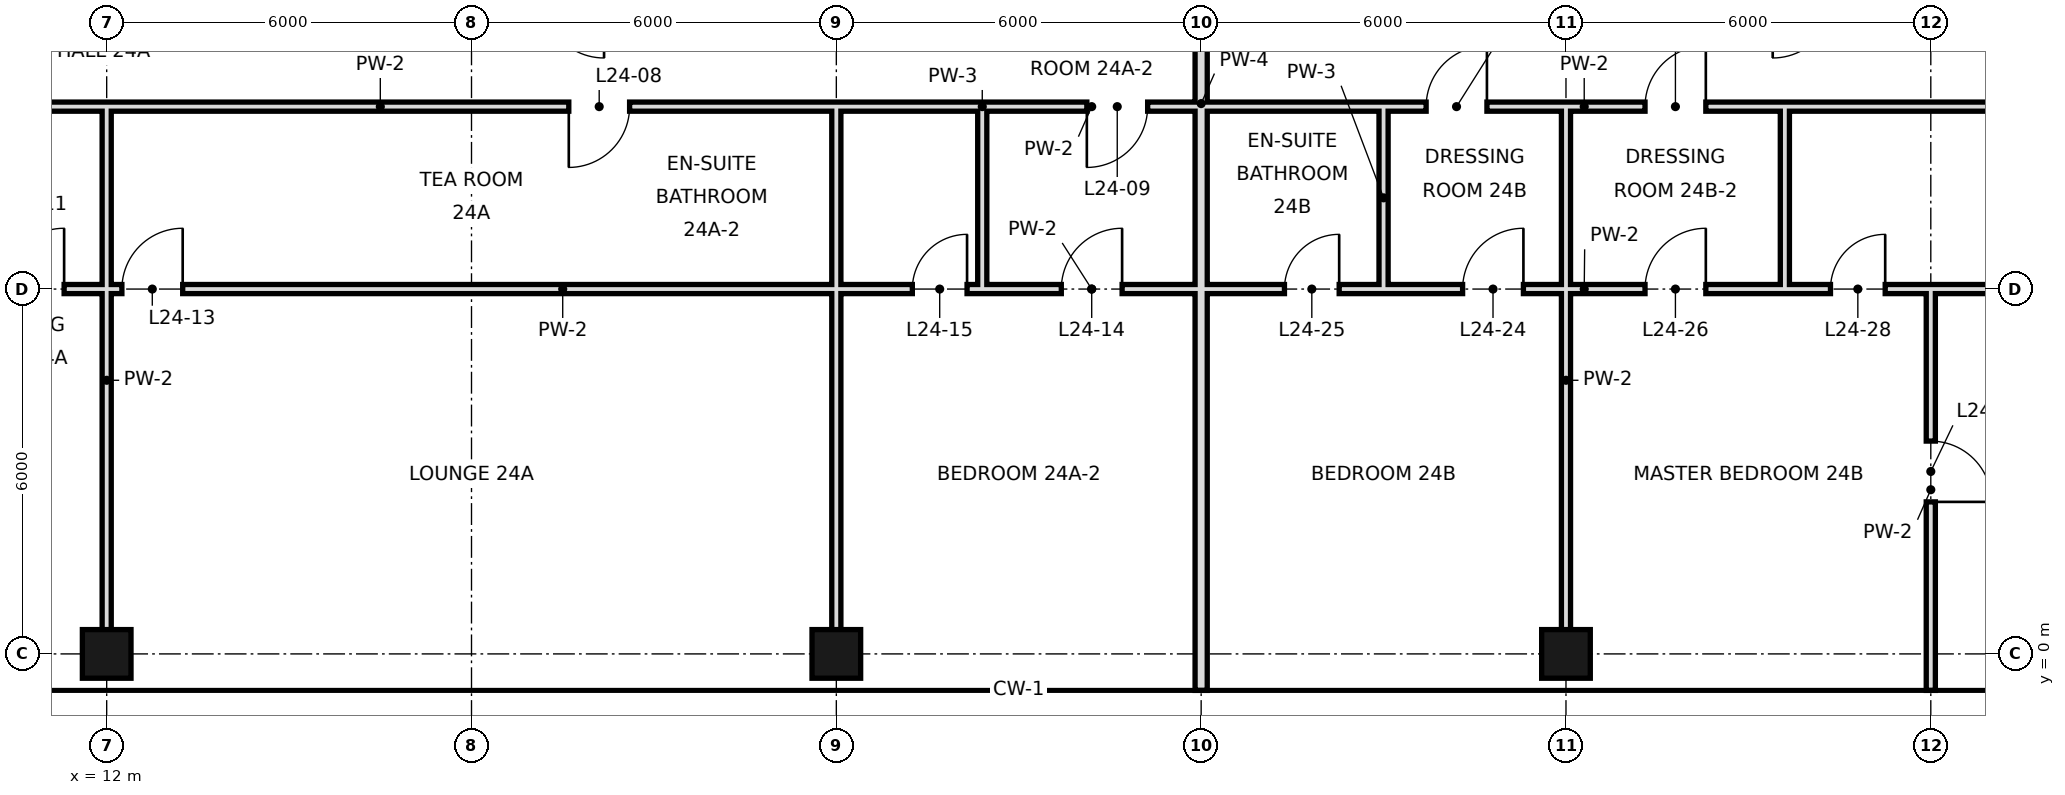
"""IFC4 building model, lengths in metres.
Left out: names, types, materials, properties, quantities, classifications, styles, units other than length and angle.
Written with IfcOpenShell. Run it as: python <this file> out.ifc"""

import sys

from ifc_helpers import new_model, si_unit, direction, frame, frame_2d, origin, origin_2d, place, context, subcontext, project, spatial, rectangle, hollow_rectangle, extrude, element, fill, save


model = new_model("IFC4")
c1 = context("Model", 3, precision=1e-05, world=origin(), true_north=direction((0.0, 1.0)))
c2 = subcontext(c1, "Body", "Model", "MODEL_VIEW")
j1 = project(units=[si_unit("LENGTHUNIT", "METRE"), si_unit("PLANEANGLEUNIT", "RADIAN")], contexts=[c1])
p1 = place(None, origin())
s1 = spatial("IfcSite", under=j1, at=p1, CompositionType="ELEMENT")
p2 = place(p1, origin())
s2 = spatial("IfcBuilding", under=s1, at=p2, CompositionType="ELEMENT")
p3 = place(p2, frame((0.0, 0.0, 110.6)))
s3 = spatial("IfcBuildingStorey", under=s2, at=p3, CompositionType="ELEMENT", Elevation=110.6)
for number, where, z_axis, x_axis in (
    (1, (12.0, 0.0, 0.0), (0.0, 0.0, 1.0), (1.0, 0.0, 0.0)),
    (2, (24.0, 0.0, 0.0), (0.0, 0.0, 1.0), (1.0, 0.0, 0.0)),
    (3, (36.0, 0.0, 0.0), (0.0, 0.0, 1.0), (1.0, 0.0, 0.0)),
):
    element("IfcColumn", number, at=place(p3, frame(where, z_axis=z_axis, x_axis=x_axis)), inside=s3, PredefinedType="COLUMN", context=c2, shape_type="SweptSolid", body=[
        extrude(hollow_rectangle(XDim=0.8, YDim=0.8, WallThickness=0.04, at=origin_2d()), origin(), (0.0, 0.0, 1.0), 3.6),
    ])
p4 = place(p3, frame((12.0, 0.0, 0.0), z_axis=(0.0, 0.0, 1.0), x_axis=(0.0, 1.0, 0.0)))
e4 = element("IfcWall", 4, at=p4, inside=s3, PredefinedType="PARTITIONING", context=c2, shape_type="SweptSolid", body=[
    extrude(rectangle(XDim=9.0, YDim=0.15, at=frame_2d((4.5, 0.0))), origin(), (0.0, 0.0, 1.0), 2.68),
])
p5 = place(p3, frame((24.0, 0.0, 0.0), z_axis=(0.0, 0.0, 1.0), x_axis=(0.0, 1.0, 0.0)))
e5 = element("IfcWall", 5, at=p5, inside=s3, PredefinedType="PARTITIONING", context=c2, shape_type="SweptSolid", body=[
    extrude(rectangle(XDim=6.0, YDim=0.15, at=frame_2d((3.0, 0.0))), origin(), (0.0, 0.0, 1.0), 2.68),
])
p6 = place(p3, frame((24.0, 6.0, 0.0), z_axis=(0.0, 0.0, 1.0), x_axis=(0.0, 1.0, 0.0)))
e6 = element("IfcWall", 6, at=p6, inside=s3, PredefinedType="PARTITIONING", context=c2, shape_type="SweptSolid", body=[
    extrude(rectangle(XDim=3.0, YDim=0.15, at=frame_2d((1.5, 0.0))), origin(), (0.0, 0.0, 1.0), 2.68),
])
p7 = place(p3, frame((26.4, 6.0, 0.0), z_axis=(0.0, 0.0, 1.0), x_axis=(0.0, 1.0, 0.0)))
e7 = element("IfcWall", 7, at=p7, inside=s3, PredefinedType="PARTITIONING", context=c2, shape_type="SweptSolid", body=[
    extrude(rectangle(XDim=3.0, YDim=0.15, at=frame_2d((1.5, 0.0))), origin(), (0.0, 0.0, 1.0), 3.38),
])
p8 = place(p3, frame((30.0, -0.6, 0.0), z_axis=(0.0, 0.0, 1.0), x_axis=(0.0, 1.0, 0.0)))
e8 = element("IfcWall", 8, at=p8, inside=s3, PredefinedType="SOLIDWALL", context=c2, shape_type="SweptSolid", body=[
    extrude(rectangle(XDim=19.3, YDim=0.2, at=frame_2d((9.65, 0.0))), origin(), (0.0, 0.0, 1.0), 2.68),
])
p9 = place(p3, frame((33.0, 6.0, 0.0), z_axis=(0.0, 0.0, 1.0), x_axis=(0.0, 1.0, 0.0)))
e9 = element("IfcWall", 9, at=p9, inside=s3, PredefinedType="PARTITIONING", context=c2, shape_type="SweptSolid", body=[
    extrude(rectangle(XDim=3.0, YDim=0.15, at=frame_2d((1.5, 0.0))), origin(), (0.0, 0.0, 1.0), 3.38),
])
p10 = place(p3, frame((36.0, 0.0, 0.0), z_axis=(0.0, 0.0, 1.0), x_axis=(0.0, 1.0, 0.0)))
e10 = element("IfcWall", 10, at=p10, inside=s3, PredefinedType="PARTITIONING", context=c2, shape_type="SweptSolid", body=[
    extrude(rectangle(XDim=9.0, YDim=0.15, at=frame_2d((4.5, 0.0))), origin(), (0.0, 0.0, 1.0), 2.68),
])
p11 = place(p3, frame((39.6, 6.0, 0.0), z_axis=(0.0, 0.0, 1.0), x_axis=(0.0, 1.0, 0.0)))
e11 = element("IfcWall", 11, at=p11, inside=s3, PredefinedType="PARTITIONING", context=c2, shape_type="SweptSolid", body=[
    extrude(rectangle(XDim=3.0, YDim=0.15, at=frame_2d((1.5, 0.0))), origin(), (0.0, 0.0, 1.0), 3.38),
])
p12 = place(p3, frame((42.0, -0.6, 0.0), z_axis=(0.0, 0.0, 1.0), x_axis=(0.0, 1.0, 0.0)))
e12 = element("IfcWall", 12, at=p12, inside=s3, PredefinedType="PARTITIONING", context=c2, shape_type="SweptSolid", body=[
    extrude(rectangle(XDim=6.6, YDim=0.15, at=frame_2d((3.3, 0.0))), origin(), (0.0, 0.0, 1.0), 2.68),
])
p13 = place(p12, frame((3.1, 0.0, 0.0)))
e13 = element("IfcOpeningElement", 13, at=p13, cuts=e12, PredefinedType="OPENING", context=c2, shape_type="SweptSolid", body=[
    extrude(rectangle(XDim=1.0, YDim=2.4, at=frame_2d((0.5, 1.2))), frame((0.0, 0.085, 0.0), z_axis=(0.0, -1.0, 0.0), x_axis=(1.0, 0.0, 0.0)), (0.0, 0.0, 1.0), 0.17),
])
p14 = place(p3, frame((9.0, 6.0, 0.0), z_axis=(0.0, 0.0, 1.0), x_axis=(1.0, 0.0, 0.0)))
e14 = element("IfcWall", 14, at=p14, inside=s3, PredefinedType="PARTITIONING", context=c2, shape_type="SweptSolid", body=[
    extrude(rectangle(XDim=15.0, YDim=0.15, at=frame_2d((7.5, 0.0))), origin(), (0.0, 0.0, 1.0), 2.93),
])
p15 = place(p14, frame((1.3, 0.0, 0.0)))
e15 = element("IfcOpeningElement", 15, at=p15, cuts=e14, PredefinedType="OPENING", context=c2, shape_type="SweptSolid", body=[
    extrude(rectangle(XDim=1.0, YDim=2.4, at=frame_2d((0.5, 1.2))), frame((0.0, 0.085, 0.0), z_axis=(0.0, -1.0, 0.0), x_axis=(1.0, 0.0, 0.0)), (0.0, 0.0, 1.0), 0.17),
])
p16 = place(p14, frame((3.25, 0.0, 0.0)))
e16 = element("IfcOpeningElement", 16, at=p16, cuts=e14, PredefinedType="OPENING", context=c2, shape_type="SweptSolid", body=[
    extrude(rectangle(XDim=1.0, YDim=2.4, at=frame_2d((0.5, 1.2))), frame((0.0, 0.085, 0.0), z_axis=(0.0, -1.0, 0.0), x_axis=(1.0, 0.0, 0.0)), (0.0, 0.0, 1.0), 0.17),
])
p17 = place(p3, frame((26.4, 6.0, 0.0), z_axis=(0.0, 0.0, 1.0), x_axis=(1.0, 0.0, 0.0)))
e17 = element("IfcWall", 17, at=p17, inside=s3, PredefinedType="PARTITIONING", context=c2, shape_type="SweptSolid", body=[
    extrude(rectangle(XDim=3.6, YDim=0.15, at=frame_2d((1.8, 0.0))), origin(), (0.0, 0.0, 1.0), 2.93),
])
p18 = place(p17, frame((1.3, 0.0, 0.0)))
e18 = element("IfcOpeningElement", 18, at=p18, cuts=e17, PredefinedType="OPENING", context=c2, shape_type="SweptSolid", body=[
    extrude(rectangle(XDim=1.0, YDim=2.4, at=frame_2d((0.5, 1.2))), frame((0.0, 0.085, 0.0), z_axis=(0.0, -1.0, 0.0), x_axis=(1.0, 0.0, 0.0)), (0.0, 0.0, 1.0), 0.17),
])
p19 = place(p3, frame((33.0, 6.0, 0.0), z_axis=(0.0, 0.0, 1.0), x_axis=(1.0, 0.0, 0.0)))
e19 = element("IfcWall", 19, at=p19, inside=s3, PredefinedType="PARTITIONING", context=c2, shape_type="SweptSolid", body=[
    extrude(rectangle(XDim=6.6, YDim=0.15, at=frame_2d((3.3, 0.0))), origin(), (0.0, 0.0, 1.0), 2.93),
])
p20 = place(p19, frame((1.3, 0.0, 0.0)))
e20 = element("IfcOpeningElement", 20, at=p20, cuts=e19, PredefinedType="OPENING", context=c2, shape_type="SweptSolid", body=[
    extrude(rectangle(XDim=1.0, YDim=2.4, at=frame_2d((0.5, 1.2))), frame((0.0, 0.085, 0.0), z_axis=(0.0, -1.0, 0.0), x_axis=(1.0, 0.0, 0.0)), (0.0, 0.0, 1.0), 0.17),
])
p21 = place(p19, frame((4.3, 0.0, 0.0)))
e21 = element("IfcOpeningElement", 21, at=p21, cuts=e19, PredefinedType="OPENING", context=c2, shape_type="SweptSolid", body=[
    extrude(rectangle(XDim=1.0, YDim=2.4, at=frame_2d((0.5, 1.2))), frame((0.0, 0.085, 0.0), z_axis=(0.0, -1.0, 0.0), x_axis=(1.0, 0.0, 0.0)), (0.0, 0.0, 1.0), 0.17),
])
p22 = place(p3, frame((24.0, 6.0, 0.0), z_axis=(0.0, 0.0, 1.0), x_axis=(1.0, 0.0, 0.0)))
e22 = element("IfcWall", 22, at=p22, inside=s3, PredefinedType="PARTITIONING", context=c2, shape_type="SweptSolid", body=[
    extrude(rectangle(XDim=2.4, YDim=0.15, at=frame_2d((1.2, 0.0))), origin(), (0.0, 0.0, 1.0), 2.93),
])
p23 = place(p22, frame((1.25, 0.0, 0.0)))
e23 = element("IfcOpeningElement", 23, at=p23, cuts=e22, PredefinedType="OPENING", context=c2, shape_type="SweptSolid", body=[
    extrude(rectangle(XDim=0.9, YDim=2.4, at=frame_2d((0.45, 1.2))), frame((0.0, 0.085, 0.0), z_axis=(0.0, -1.0, 0.0), x_axis=(1.0, 0.0, 0.0)), (0.0, 0.0, 1.0), 0.17),
])
p24 = place(p3, frame((30.0, 6.0, 0.0), z_axis=(0.0, 0.0, 1.0), x_axis=(1.0, 0.0, 0.0)))
e24 = element("IfcWall", 24, at=p24, inside=s3, PredefinedType="PARTITIONING", context=c2, shape_type="SweptSolid", body=[
    extrude(rectangle(XDim=3.0, YDim=0.15, at=frame_2d((1.5, 0.0))), origin(), (0.0, 0.0, 1.0), 2.93),
])
p25 = place(p24, frame((1.37, 0.0, 0.0)))
e25 = element("IfcOpeningElement", 25, at=p25, cuts=e24, PredefinedType="OPENING", context=c2, shape_type="SweptSolid", body=[
    extrude(rectangle(XDim=0.9, YDim=2.4, at=frame_2d((0.45, 1.2))), frame((0.0, 0.085, 0.0), z_axis=(0.0, -1.0, 0.0), x_axis=(1.0, 0.0, 0.0)), (0.0, 0.0, 1.0), 0.17),
])
p26 = place(p3, frame((39.6, 6.0, 0.0), z_axis=(0.0, 0.0, 1.0), x_axis=(1.0, 0.0, 0.0)))
e26 = element("IfcWall", 26, at=p26, inside=s3, PredefinedType="PARTITIONING", context=c2, shape_type="SweptSolid", body=[
    extrude(rectangle(XDim=8.4, YDim=0.15, at=frame_2d((4.2, 0.0))), origin(), (0.0, 0.0, 1.0), 2.93),
])
p27 = place(p26, frame((0.75, 0.0, 0.0)))
e27 = element("IfcOpeningElement", 27, at=p27, cuts=e26, PredefinedType="OPENING", context=c2, shape_type="SweptSolid", body=[
    extrude(rectangle(XDim=0.9, YDim=2.4, at=frame_2d((0.45, 1.2))), frame((0.0, 0.085, 0.0), z_axis=(0.0, -1.0, 0.0), x_axis=(1.0, 0.0, 0.0)), (0.0, 0.0, 1.0), 0.17),
])
p28 = place(p3, frame((9.0, 9.0, 0.0), z_axis=(0.0, 0.0, 1.0), x_axis=(1.0, 0.0, 0.0)))
e28 = element("IfcWall", 28, at=p28, inside=s3, PredefinedType="PARTITIONING", context=c2, shape_type="SweptSolid", body=[
    extrude(rectangle(XDim=15.0, YDim=0.15, at=frame_2d((7.5, 0.0))), origin(), (0.0, 0.0, 1.0), 3.38),
])
p29 = place(p28, frame((1.0, 0.0, 0.0)))
e29 = element("IfcOpeningElement", 29, at=p29, cuts=e28, PredefinedType="OPENING", context=c2, shape_type="SweptSolid", body=[
    extrude(rectangle(XDim=1.0, YDim=2.4, at=frame_2d((0.5, 1.2))), frame((0.0, 0.085, 0.0), z_axis=(0.0, -1.0, 0.0), x_axis=(1.0, 0.0, 0.0)), (0.0, 0.0, 1.0), 0.17),
])
p30 = place(p28, frame((10.6, 0.0, 0.0)))
e30 = element("IfcOpeningElement", 30, at=p30, cuts=e28, PredefinedType="OPENING", context=c2, shape_type="SweptSolid", body=[
    extrude(rectangle(XDim=1.0, YDim=2.4, at=frame_2d((0.5, 1.2))), frame((0.0, 0.085, 0.0), z_axis=(0.0, -1.0, 0.0), x_axis=(1.0, 0.0, 0.0)), (0.0, 0.0, 1.0), 0.17),
])
p31 = place(p3, frame((26.4, 9.0, 0.0), z_axis=(0.0, 0.0, 1.0), x_axis=(1.0, 0.0, 0.0)))
e31 = element("IfcWall", 31, at=p31, inside=s3, PredefinedType="PARTITIONING", context=c2, shape_type="SweptSolid", body=[
    extrude(rectangle(XDim=3.6, YDim=0.15, at=frame_2d((1.8, 0.0))), origin(), (0.0, 0.0, 1.0), 3.38),
])
p32 = place(p31, frame((1.72, 0.0, 0.0)))
e32 = element("IfcOpeningElement", 32, at=p32, cuts=e31, PredefinedType="OPENING", context=c2, shape_type="SweptSolid", body=[
    extrude(rectangle(XDim=1.0, YDim=2.4, at=frame_2d((0.5, 1.2))), frame((0.0, 0.085, 0.0), z_axis=(0.0, -1.0, 0.0), x_axis=(1.0, 0.0, 0.0)), (0.0, 0.0, 1.0), 0.17),
])
p33 = place(p3, frame((33.0, 9.0, 0.0), z_axis=(0.0, 0.0, 1.0), x_axis=(1.0, 0.0, 0.0)))
e33 = element("IfcWall", 33, at=p33, inside=s3, PredefinedType="PARTITIONING", context=c2, shape_type="SweptSolid", body=[
    extrude(rectangle(XDim=6.6, YDim=0.15, at=frame_2d((3.3, 0.0))), origin(), (0.0, 0.0, 1.0), 3.38),
])
p34 = place(p33, frame((0.7, 0.0, 0.0)))
e34 = element("IfcOpeningElement", 34, at=p34, cuts=e33, PredefinedType="OPENING", context=c2, shape_type="SweptSolid", body=[
    extrude(rectangle(XDim=1.0, YDim=2.4, at=frame_2d((0.5, 1.2))), frame((0.0, 0.085, 0.0), z_axis=(0.0, -1.0, 0.0), x_axis=(1.0, 0.0, 0.0)), (0.0, 0.0, 1.0), 0.17),
])
p35 = place(p33, frame((4.3, 0.0, 0.0)))
e35 = element("IfcOpeningElement", 35, at=p35, cuts=e33, PredefinedType="OPENING", context=c2, shape_type="SweptSolid", body=[
    extrude(rectangle(XDim=1.0, YDim=2.4, at=frame_2d((0.5, 1.2))), frame((0.0, 0.085, 0.0), z_axis=(0.0, -1.0, 0.0), x_axis=(1.0, 0.0, 0.0)), (0.0, 0.0, 1.0), 0.17),
])
p36 = place(p3, frame((24.0, 9.0, 0.0), z_axis=(0.0, 0.0, 1.0), x_axis=(1.0, 0.0, 0.0)))
e36 = element("IfcWall", 36, at=p36, inside=s3, PredefinedType="PARTITIONING", context=c2, shape_type="SweptSolid", body=[
    extrude(rectangle(XDim=2.4, YDim=0.15, at=frame_2d((1.2, 0.0))), origin(), (0.0, 0.0, 1.0), 3.38),
])
p37 = place(p3, frame((30.0, 9.0, 0.0), z_axis=(0.0, 0.0, 1.0), x_axis=(1.0, 0.0, 0.0)))
e37 = element("IfcWall", 37, at=p37, inside=s3, PredefinedType="PARTITIONING", context=c2, shape_type="SweptSolid", body=[
    extrude(rectangle(XDim=3.0, YDim=0.15, at=frame_2d((1.5, 0.0))), origin(), (0.0, 0.0, 1.0), 3.38),
])
p38 = place(p3, frame((39.6, 9.0, 0.0), z_axis=(0.0, 0.0, 1.0), x_axis=(1.0, 0.0, 0.0)))
e38 = element("IfcWall", 38, at=p38, inside=s3, PredefinedType="PARTITIONING", context=c2, shape_type="SweptSolid", body=[
    extrude(rectangle(XDim=8.4, YDim=0.15, at=frame_2d((4.2, 0.0))), origin(), (0.0, 0.0, 1.0), 3.38),
])
p39 = place(p30, frame((1.0, 0.0, 0.0), z_axis=(0.0, 0.0, 1.0), x_axis=(-1.0, 0.0, 0.0)))
e39 = element("IfcDoor", 39, at=p39, inside=s3, OperationType="SINGLE_SWING_RIGHT", PredefinedType="DOOR", context=c2, shape_type="SweptSolid", body=[
    extrude(rectangle(XDim=1.0, YDim=2.4, at=frame_2d((0.5, 1.2))), frame((0.0, 0.025, 0.0), z_axis=(0.0, -1.0, 0.0), x_axis=(1.0, 0.0, 0.0)), (0.0, 0.0, 1.0), 0.05),
])
fill(e30, e39)
p40 = place(p32, frame((1.0, 0.0, 0.0), z_axis=(0.0, 0.0, 1.0), x_axis=(-1.0, 0.0, 0.0)))
e40 = element("IfcDoor", 40, at=p40, inside=s3, OperationType="SINGLE_SWING_RIGHT", PredefinedType="DOOR", context=c2, shape_type="SweptSolid", body=[
    extrude(rectangle(XDim=1.0, YDim=2.4, at=frame_2d((0.5, 1.2))), frame((0.0, 0.025, 0.0), z_axis=(0.0, -1.0, 0.0), x_axis=(1.0, 0.0, 0.0)), (0.0, 0.0, 1.0), 0.05),
])
fill(e32, e40)
p41 = place(p15, frame((1.0, 0.0, 0.0), z_axis=(0.0, 0.0, 1.0), x_axis=(-1.0, 0.0, 0.0)))
e41 = element("IfcDoor", 41, at=p41, inside=s3, OperationType="SINGLE_SWING_LEFT", PredefinedType="DOOR", context=c2, shape_type="SweptSolid", body=[
    extrude(rectangle(XDim=1.0, YDim=2.4, at=frame_2d((0.5, 1.2))), frame((0.0, 0.025, 0.0), z_axis=(0.0, -1.0, 0.0), x_axis=(1.0, 0.0, 0.0)), (0.0, 0.0, 1.0), 0.05),
])
fill(e15, e41)
p42 = place(p16, frame((1.0, 0.0, 0.0), z_axis=(0.0, 0.0, 1.0), x_axis=(-1.0, 0.0, 0.0)))
e42 = element("IfcDoor", 42, at=p42, inside=s3, OperationType="SINGLE_SWING_LEFT", PredefinedType="DOOR", context=c2, shape_type="SweptSolid", body=[
    extrude(rectangle(XDim=1.0, YDim=2.4, at=frame_2d((0.5, 1.2))), frame((0.0, 0.025, 0.0), z_axis=(0.0, -1.0, 0.0), x_axis=(1.0, 0.0, 0.0)), (0.0, 0.0, 1.0), 0.05),
])
fill(e16, e42)
p43 = place(p18, frame((1.0, 0.0, 0.0), z_axis=(0.0, 0.0, 1.0), x_axis=(-1.0, 0.0, 0.0)))
e43 = element("IfcDoor", 43, at=p43, inside=s3, OperationType="SINGLE_SWING_LEFT", PredefinedType="DOOR", context=c2, shape_type="SweptSolid", body=[
    extrude(rectangle(XDim=1.0, YDim=2.4, at=frame_2d((0.5, 1.2))), frame((0.0, 0.025, 0.0), z_axis=(0.0, -1.0, 0.0), x_axis=(1.0, 0.0, 0.0)), (0.0, 0.0, 1.0), 0.05),
])
fill(e18, e43)
p44 = place(p23, frame((0.9, 0.0, 0.0), z_axis=(0.0, 0.0, 1.0), x_axis=(-1.0, 0.0, 0.0)))
e44 = element("IfcDoor", 44, at=p44, inside=s3, OperationType="SINGLE_SWING_LEFT", PredefinedType="DOOR", context=c2, shape_type="SweptSolid", body=[
    extrude(rectangle(XDim=0.9, YDim=2.4, at=frame_2d((0.45, 1.2))), frame((0.0, 0.025, 0.0), z_axis=(0.0, -1.0, 0.0), x_axis=(1.0, 0.0, 0.0)), (0.0, 0.0, 1.0), 0.05),
])
fill(e23, e44)
p45 = place(p34, frame((1.0, 0.0, 0.0), z_axis=(0.0, 0.0, 1.0), x_axis=(-1.0, 0.0, 0.0)))
e45 = element("IfcDoor", 45, at=p45, inside=s3, OperationType="SINGLE_SWING_LEFT", PredefinedType="DOOR", context=c2, shape_type="SweptSolid", body=[
    extrude(rectangle(XDim=1.0, YDim=2.4, at=frame_2d((0.5, 1.2))), frame((0.0, 0.025, 0.0), z_axis=(0.0, -1.0, 0.0), x_axis=(1.0, 0.0, 0.0)), (0.0, 0.0, 1.0), 0.05),
])
fill(e34, e45)
p46 = place(p35, frame((1.0, 0.0, 0.0), z_axis=(0.0, 0.0, 1.0), x_axis=(-1.0, 0.0, 0.0)))
e46 = element("IfcDoor", 46, at=p46, inside=s3, OperationType="SINGLE_SWING_LEFT", PredefinedType="DOOR", context=c2, shape_type="SweptSolid", body=[
    extrude(rectangle(XDim=1.0, YDim=2.4, at=frame_2d((0.5, 1.2))), frame((0.0, 0.025, 0.0), z_axis=(0.0, -1.0, 0.0), x_axis=(1.0, 0.0, 0.0)), (0.0, 0.0, 1.0), 0.05),
])
fill(e35, e46)
p47 = place(p20, frame((1.0, 0.0, 0.0), z_axis=(0.0, 0.0, 1.0), x_axis=(-1.0, 0.0, 0.0)))
e47 = element("IfcDoor", 47, at=p47, inside=s3, OperationType="SINGLE_SWING_LEFT", PredefinedType="DOOR", context=c2, shape_type="SweptSolid", body=[
    extrude(rectangle(XDim=1.0, YDim=2.4, at=frame_2d((0.5, 1.2))), frame((0.0, 0.025, 0.0), z_axis=(0.0, -1.0, 0.0), x_axis=(1.0, 0.0, 0.0)), (0.0, 0.0, 1.0), 0.05),
])
fill(e20, e47)
p48 = place(p25, frame((0.9, 0.0, 0.0), z_axis=(0.0, 0.0, 1.0), x_axis=(-1.0, 0.0, 0.0)))
e48 = element("IfcDoor", 48, at=p48, inside=s3, OperationType="SINGLE_SWING_LEFT", PredefinedType="DOOR", context=c2, shape_type="SweptSolid", body=[
    extrude(rectangle(XDim=0.9, YDim=2.4, at=frame_2d((0.45, 1.2))), frame((0.0, 0.025, 0.0), z_axis=(0.0, -1.0, 0.0), x_axis=(1.0, 0.0, 0.0)), (0.0, 0.0, 1.0), 0.05),
])
fill(e25, e48)
p49 = place(p21, frame((1.0, 0.0, 0.0), z_axis=(0.0, 0.0, 1.0), x_axis=(-1.0, 0.0, 0.0)))
e49 = element("IfcDoor", 49, at=p49, inside=s3, OperationType="SINGLE_SWING_LEFT", PredefinedType="DOOR", context=c2, shape_type="SweptSolid", body=[
    extrude(rectangle(XDim=1.0, YDim=2.4, at=frame_2d((0.5, 1.2))), frame((0.0, 0.025, 0.0), z_axis=(0.0, -1.0, 0.0), x_axis=(1.0, 0.0, 0.0)), (0.0, 0.0, 1.0), 0.05),
])
fill(e21, e49)
p50 = place(p13, frame((1.0, 0.0, 0.0), z_axis=(0.0, 0.0, 1.0), x_axis=(-1.0, 0.0, 0.0)))
e50 = element("IfcDoor", 50, at=p50, inside=s3, OperationType="SINGLE_SWING_RIGHT", PredefinedType="DOOR", context=c2, shape_type="SweptSolid", body=[
    extrude(rectangle(XDim=1.0, YDim=2.4, at=frame_2d((0.5, 1.2))), frame((0.0, 0.025, 0.0), z_axis=(0.0, -1.0, 0.0), x_axis=(1.0, 0.0, 0.0)), (0.0, 0.0, 1.0), 0.05),
])
fill(e13, e50)
p51 = place(p27, frame((0.9, 0.0, 0.0), z_axis=(0.0, 0.0, 1.0), x_axis=(-1.0, 0.0, 0.0)))
e51 = element("IfcDoor", 51, at=p51, inside=s3, OperationType="SINGLE_SWING_LEFT", PredefinedType="DOOR", context=c2, shape_type="SweptSolid", body=[
    extrude(rectangle(XDim=0.9, YDim=2.4, at=frame_2d((0.45, 1.2))), frame((0.0, 0.025, 0.0), z_axis=(0.0, -1.0, 0.0), x_axis=(1.0, 0.0, 0.0)), (0.0, 0.0, 1.0), 0.05),
])
fill(e27, e51)
save(model, sys.argv[1])
